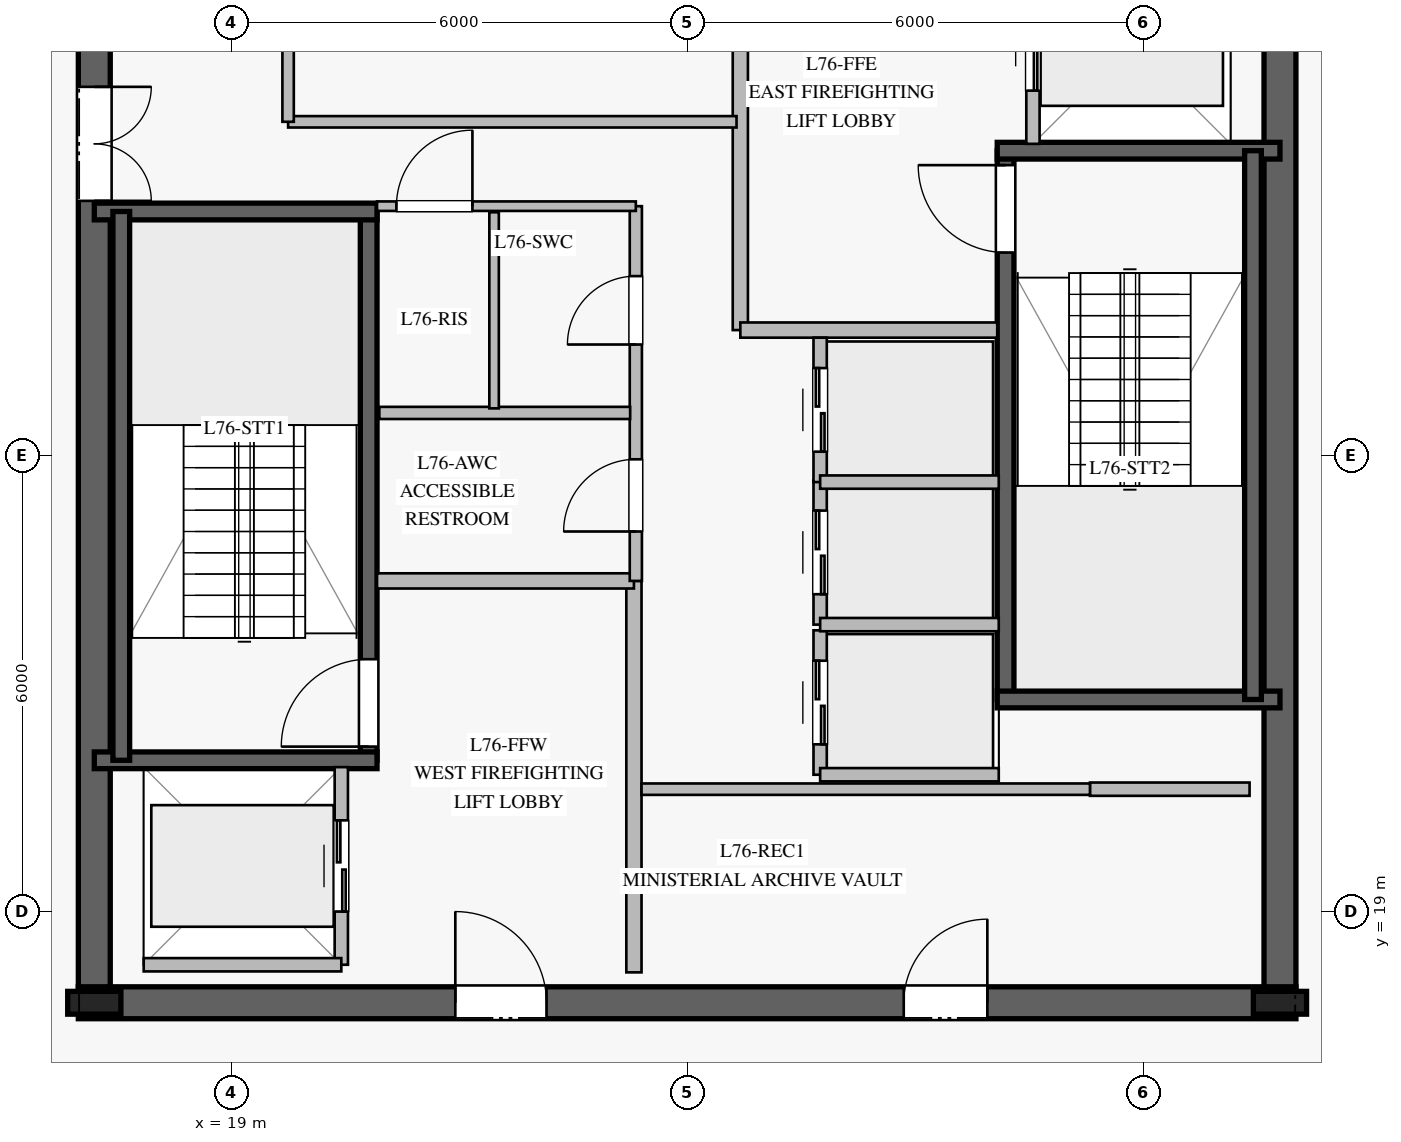
"""IFC4 building model, lengths in metres.
Left out: names, types, materials, properties, quantities, classifications, styles, units other than length and angle.
Written with IfcOpenShell. Run it as: python <this file> out.ifc"""

import sys

from ifc_helpers import new_model, si_unit, direction, frame, frame_2d, origin, origin_2d, place, context, subcontext, project, spatial, rectangle, i_section, extrude, element, fill, save


model = new_model("IFC4")
c1 = context("Model", 3, precision=1e-05, world=origin(), true_north=direction((0.0, 1.0)))
c2 = subcontext(c1, "Body", "Model", "MODEL_VIEW")
j1 = project(units=[si_unit("LENGTHUNIT", "METRE"), si_unit("PLANEANGLEUNIT", "RADIAN")], contexts=[c1])
p1 = place(None, origin())
s1 = spatial("IfcSite", under=j1, at=p1, CompositionType="ELEMENT")
p2 = place(p1, origin())
s2 = spatial("IfcBuilding", under=s1, at=p2, CompositionType="ELEMENT")
p3 = place(p2, frame((0.0, 0.0, 314.2)))
s3 = spatial("IfcBuildingStorey", under=s2, at=p3, CompositionType="ELEMENT", Elevation=314.2)
p4 = place(p3, frame((16.99, 17.8, 0.0), z_axis=(0.0, 0.0, 1.0), x_axis=(1.0, 0.0, 0.0)))
e1 = element("IfcWall", 1, at=p4, inside=s3, PredefinedType="SHEAR", context=c2, shape_type="SweptSolid", body=[
    extrude(rectangle(XDim=16.02, YDim=0.42, at=frame_2d((8.01, 0.0))), origin(), (0.0, 0.0, 1.0), 3.74),
])
p5 = place(p4, frame((4.96, 0.0, 0.0)))
e2 = element("IfcOpeningElement", 2, at=p5, cuts=e1, PredefinedType="OPENING", context=c2, shape_type="SweptSolid", body=[
    extrude(rectangle(XDim=1.2, YDim=2.25, at=frame_2d((0.6, 1.125))), frame((0.0, 0.22, 0.0), z_axis=(0.0, -1.0, 0.0), x_axis=(1.0, 0.0, 0.0)), (0.0, 0.0, 1.0), 0.44),
])
p6 = place(p4, frame((10.86, 0.0, 0.0)))
e3 = element("IfcOpeningElement", 3, at=p6, cuts=e1, PredefinedType="OPENING", context=c2, shape_type="SweptSolid", body=[
    extrude(rectangle(XDim=1.1, YDim=2.2, at=frame_2d((0.55, 1.1))), frame((0.0, 0.22, 0.0), z_axis=(0.0, -1.0, 0.0), x_axis=(1.0, 0.0, 0.0)), (0.0, 0.0, 1.0), 0.44),
])
p7 = place(p3, frame((17.2, 31.99, 0.0), z_axis=(0.0, 0.0, 1.0), x_axis=(0.0, -1.0, 0.0)))
e4 = element("IfcWall", 4, at=p7, inside=s3, PredefinedType="SHEAR", context=c2, shape_type="SweptSolid", body=[
    extrude(rectangle(XDim=13.98, YDim=0.42, at=frame_2d((6.99, 0.0))), origin(), (0.0, 0.0, 1.0), 3.74),
])
p8 = place(p7, frame((2.14, 0.0, 0.0)))
e5 = element("IfcOpeningElement", 5, at=p8, cuts=e4, PredefinedType="OPENING", context=c2, shape_type="SweptSolid", body=[
    extrude(rectangle(XDim=1.5, YDim=2.2, at=frame_2d((0.75, 1.1))), frame((0.0, 0.22, 0.0), z_axis=(0.0, -1.0, 0.0), x_axis=(1.0, 0.0, 0.0)), (0.0, 0.0, 1.0), 0.44),
])
p9 = place(p3, frame((32.8, 18.01, 0.0), z_axis=(0.0, 0.0, 1.0), x_axis=(0.0, 1.0, 0.0)))
e6 = element("IfcWall", 6, at=p9, inside=s3, PredefinedType="SHEAR", context=c2, shape_type="SweptSolid", body=[
    extrude(rectangle(XDim=13.98, YDim=0.42, at=frame_2d((6.99, 0.0))), origin(), (0.0, 0.0, 1.0), 3.74),
])
for number, where, z_axis, x_axis in (
    (7, (17.2, 17.8, 0.0), (0.0, 0.0, 1.0), (1.0, 0.0, 0.0)),
    (8, (32.8, 17.8, 0.0), (0.0, 0.0, 1.0), (1.0, 0.0, 0.0)),
):
    element("IfcColumn", number, at=place(p3, frame(where, z_axis=z_axis, x_axis=x_axis)), inside=s3, PredefinedType="COLUMN", context=c2, shape_type="SweptSolid", body=[
        extrude(i_section(OverallWidth=0.3, OverallDepth=0.7, WebThickness=0.017, FlangeThickness=0.032, at=origin_2d()), origin(), (0.0, 0.0, 1.0), 4.0),
    ])
p10 = place(p3, frame((20.81, 20.99, 0.0), z_axis=(0.0, 0.0, 1.0), x_axis=(0.0, 1.0, 0.0)))
e9 = element("IfcWall", 9, at=p10, inside=s3, PredefinedType="SOLIDWALL", context=c2, shape_type="SweptSolid", body=[
    extrude(rectangle(XDim=7.22, YDim=0.22, at=frame_2d((3.61, 0.0))), origin(), (0.0, 0.0, 1.0), 3.74),
])
p11 = place(p10, frame((0.18, 0.0, 0.0)))
e10 = element("IfcOpeningElement", 10, at=p11, cuts=e9, PredefinedType="OPENING", context=c2, shape_type="SweptSolid", body=[
    extrude(rectangle(XDim=1.15, YDim=2.2, at=frame_2d((0.575, 1.1))), frame((0.0, 0.12, 0.0), z_axis=(0.0, -1.0, 0.0), x_axis=(1.0, 0.0, 0.0)), (0.0, 0.0, 1.0), 0.24),
])
for number, where, z_axis, x_axis in (
    (11, (17.2, 20.99, 0.0), (0.0, 0.0, 1.0), (1.0, 0.0, 0.0)),
    (12, (17.2, 28.21, 0.0), (0.0, 0.0, 1.0), (1.0, 0.0, 0.0)),
):
    element("IfcWall", number, at=place(p3, frame(where, z_axis=z_axis, x_axis=x_axis)), inside=s3, PredefinedType="SOLIDWALL", context=c2, shape_type="SweptSolid", body=[
        extrude(rectangle(XDim=3.72, YDim=0.22, at=frame_2d((1.86, 0.0))), origin(), (0.0, 0.0, 1.0), 3.74),
    ])
p12 = place(p3, frame((17.555, 28.21, 0.0), z_axis=(0.0, 0.0, 1.0), x_axis=(0.0, -1.0, 0.0)))
e13 = element("IfcWall", 13, at=p12, inside=s3, PredefinedType="SOLIDWALL", context=c2, shape_type="SweptSolid", body=[
    extrude(rectangle(XDim=7.22, YDim=0.22, at=frame_2d((3.61, 0.0))), origin(), (0.0, 0.0, 1.0), 3.74),
])
p13 = place(p3, frame((29.19, 21.79, 0.0), z_axis=(0.0, 0.0, 1.0), x_axis=(0.0, 1.0, 0.0)))
e14 = element("IfcWall", 14, at=p13, inside=s3, PredefinedType="SOLIDWALL", context=c2, shape_type="SweptSolid", body=[
    extrude(rectangle(XDim=7.22, YDim=0.22, at=frame_2d((3.61, 0.0))), origin(), (0.0, 0.0, 1.0), 3.74),
])
p14 = place(p13, frame((5.88, 0.0, 0.0)))
e15 = element("IfcOpeningElement", 15, at=p14, cuts=e14, PredefinedType="OPENING", context=c2, shape_type="SweptSolid", body=[
    extrude(rectangle(XDim=1.15, YDim=2.2, at=frame_2d((0.575, 1.1))), frame((0.0, 0.12, 0.0), z_axis=(0.0, -1.0, 0.0), x_axis=(1.0, 0.0, 0.0)), (0.0, 0.0, 1.0), 0.24),
])
for number, where, z_axis, x_axis in (
    (16, (29.08, 21.79, 0.0), (0.0, 0.0, 1.0), (1.0, 0.0, 0.0)),
    (17, (29.08, 29.01, 0.0), (0.0, 0.0, 1.0), (1.0, 0.0, 0.0)),
):
    element("IfcWall", number, at=place(p3, frame(where, z_axis=z_axis, x_axis=x_axis)), inside=s3, PredefinedType="SOLIDWALL", context=c2, shape_type="SweptSolid", body=[
        extrude(rectangle(XDim=3.72, YDim=0.22, at=frame_2d((1.86, 0.0))), origin(), (0.0, 0.0, 1.0), 3.74),
    ])
p15 = place(p3, frame((32.445, 29.01, 0.0), z_axis=(0.0, 0.0, 1.0), x_axis=(0.0, -1.0, 0.0)))
e18 = element("IfcWall", 18, at=p15, inside=s3, PredefinedType="SOLIDWALL", context=c2, shape_type="SweptSolid", body=[
    extrude(rectangle(XDim=7.22, YDim=0.22, at=frame_2d((3.61, 0.0))), origin(), (0.0, 0.0, 1.0), 3.74),
])
p16 = place(p3, frame((24.3, 18.2, 0.0), z_axis=(0.0, 0.0, 1.0), x_axis=(0.0, 1.0, 0.0)))
e19 = element("IfcWall", 19, at=p16, inside=s3, PredefinedType="PARTITIONING", context=c2, shape_type="SweptSolid", body=[
    extrude(rectangle(XDim=5.15, YDim=0.2, at=frame_2d((2.575, 0.0))), origin(), (0.0, 0.0, 1.0), 3.74),
])
p17 = place(p3, frame((20.92, 23.35, 0.0), z_axis=(0.0, 0.0, 1.0), x_axis=(1.0, 0.0, 0.0)))
e20 = element("IfcWall", 20, at=p17, inside=s3, PredefinedType="PARTITIONING", context=c2, shape_type="SweptSolid", body=[
    extrude(rectangle(XDim=3.38, YDim=0.2, at=frame_2d((1.69, 0.0))), origin(), (0.0, 0.0, 1.0), 3.74),
])
p18 = place(p3, frame((25.7, 26.65, 0.0), z_axis=(0.0, 0.0, 1.0), x_axis=(0.0, 1.0, 0.0)))
e21 = element("IfcWall", 21, at=p18, inside=s3, PredefinedType="PARTITIONING", context=c2, shape_type="SweptSolid", body=[
    extrude(rectangle(XDim=5.15, YDim=0.2, at=frame_2d((2.575, 0.0))), origin(), (0.0, 0.0, 1.0), 3.74),
])
p19 = place(p3, frame((25.7, 26.65, 0.0), z_axis=(0.0, 0.0, 1.0), x_axis=(1.0, 0.0, 0.0)))
e22 = element("IfcWall", 22, at=p19, inside=s3, PredefinedType="PARTITIONING", context=c2, shape_type="SweptSolid", body=[
    extrude(rectangle(XDim=3.38, YDim=0.2, at=frame_2d((1.69, 0.0))), origin(), (0.0, 0.0, 1.0), 3.74),
])
p20 = place(p3, frame((24.325, 23.35, 0.0), z_axis=(0.0, 0.0, 1.0), x_axis=(0.0, 1.0, 0.0)))
e23 = element("IfcWall", 23, at=p20, inside=s3, PredefinedType="PLUMBINGWALL", context=c2, shape_type="SweptSolid", body=[
    extrude(rectangle(XDim=4.93, YDim=0.16, at=frame_2d((2.465, 0.0))), origin(), (0.0, 0.0, 1.0), 3.74),
])
p21 = place(p20, frame((0.65, 0.0, 0.0)))
e24 = element("IfcOpeningElement", 24, at=p21, cuts=e23, PredefinedType="OPENING", context=c2, shape_type="SweptSolid", body=[
    extrude(rectangle(XDim=0.95, YDim=2.1, at=frame_2d((0.475, 1.05))), frame((0.0, 0.09, 0.0), z_axis=(0.0, -1.0, 0.0), x_axis=(1.0, 0.0, 0.0)), (0.0, 0.0, 1.0), 0.18),
])
p22 = place(p20, frame((3.11, 0.0, 0.0)))
e25 = element("IfcOpeningElement", 25, at=p22, cuts=e23, PredefinedType="OPENING", context=c2, shape_type="SweptSolid", body=[
    extrude(rectangle(XDim=0.9, YDim=2.1, at=frame_2d((0.45, 1.05))), frame((0.0, 0.09, 0.0), z_axis=(0.0, -1.0, 0.0), x_axis=(1.0, 0.0, 0.0)), (0.0, 0.0, 1.0), 0.18),
])
p23 = place(p3, frame((20.92, 28.28, 0.0), z_axis=(0.0, 0.0, 1.0), x_axis=(1.0, 0.0, 0.0)))
e26 = element("IfcWall", 26, at=p23, inside=s3, PredefinedType="PARTITIONING", context=c2, shape_type="SweptSolid", body=[
    extrude(rectangle(XDim=3.405, YDim=0.125, at=frame_2d((1.703, 0.0))), origin(), (0.0, 0.0, 1.0), 3.74),
])
p24 = place(p23, frame((0.255, 0.0, 0.0)))
e27 = element("IfcOpeningElement", 27, at=p24, cuts=e26, PredefinedType="OPENING", context=c2, shape_type="SweptSolid", body=[
    extrude(rectangle(XDim=1.0, YDim=2.15, at=frame_2d((0.5, 1.075))), frame((0.0, 0.073, 0.0), z_axis=(0.0, -1.0, 0.0), x_axis=(1.0, 0.0, 0.0)), (0.0, 0.0, 1.0), 0.145),
])
p25 = place(p3, frame((20.95, 25.56, 0.0), z_axis=(0.0, 0.0, 1.0), x_axis=(1.0, 0.0, 0.0)))
e28 = element("IfcWall", 28, at=p25, inside=s3, PredefinedType="PLUMBINGWALL", context=c2, shape_type="SweptSolid", body=[
    extrude(rectangle(XDim=3.3, YDim=0.16, at=frame_2d((1.65, 0.0))), origin(), (0.0, 0.0, 1.0), 3.74),
])
p26 = place(p3, frame((22.46, 25.62, 0.0), z_axis=(0.0, 0.0, 1.0), x_axis=(0.0, 1.0, 0.0)))
e29 = element("IfcWall", 29, at=p26, inside=s3, PredefinedType="PARTITIONING", context=c2, shape_type="SweptSolid", body=[
    extrude(rectangle(XDim=2.58, YDim=0.125, at=frame_2d((1.29, 0.0))), origin(), (0.0, 0.0, 1.0), 3.74),
])
p27 = place(p3, frame((30.3, 20.61, 0.0), z_axis=(0.0, 0.0, 1.0), x_axis=(1.0, 0.0, 0.0)))
e30 = element("IfcWall", 30, at=p27, inside=s3, PredefinedType="PARTITIONING", context=c2, shape_type="SweptSolid", body=[
    extrude(rectangle(XDim=2.1, YDim=0.175, at=frame_2d((1.05, 0.0))), origin(), (0.0, 0.0, 1.0), 3.74),
])
p28 = place(p3, frame((24.4, 20.61, 0.0), z_axis=(0.0, 0.0, 1.0), x_axis=(1.0, 0.0, 0.0)))
e31 = element("IfcWall", 31, at=p28, inside=s3, PredefinedType="PARTITIONING", context=c2, shape_type="SweptSolid", body=[
    extrude(rectangle(XDim=5.9, YDim=0.15, at=frame_2d((2.95, 0.0))), origin(), (0.0, 0.0, 1.0), 3.74),
])
p29 = place(p3, frame((19.75, 29.39, 0.0), z_axis=(0.0, 0.0, 1.0), x_axis=(1.0, 0.0, 0.0)))
e32 = element("IfcWall", 32, at=p29, inside=s3, PredefinedType="PARTITIONING", context=c2, shape_type="SweptSolid", body=[
    extrude(rectangle(XDim=5.9, YDim=0.15, at=frame_2d((2.95, 0.0))), origin(), (0.0, 0.0, 1.0), 3.74),
])
p30 = place(p3, frame((19.75, 29.39, 0.0), z_axis=(0.0, 0.0, 1.0), x_axis=(0.0, 1.0, 0.0)))
e33 = element("IfcWall", 33, at=p30, inside=s3, PredefinedType="PARTITIONING", context=c2, shape_type="SweptSolid", body=[
    extrude(rectangle(XDim=2.41, YDim=0.15, at=frame_2d((1.205, 0.0))), origin(), (0.0, 0.0, 1.0), 3.74),
])
p31 = place(p3, frame((26.75, 20.8, 0.0), z_axis=(0.0, 0.0, 1.0), x_axis=(0.0, 1.0, 0.0)))
e34 = element("IfcWall", 34, at=p31, inside=s3, PredefinedType="PARTITIONING", context=c2, shape_type="SweptSolid", body=[
    extrude(rectangle(XDim=1.9, YDim=0.175, at=frame_2d((0.95, 0.0))), origin(), (0.0, 0.0, 1.0), 3.74),
])
p32 = place(p31, frame((0.4, 0.0, 0.0)))
e35 = element("IfcOpeningElement", 35, at=p32, cuts=e34, PredefinedType="OPENING", context=c2, shape_type="SweptSolid", body=[
    extrude(rectangle(XDim=1.1, YDim=2.2, at=frame_2d((0.55, 1.1))), frame((0.0, 0.098, 0.0), z_axis=(0.0, -1.0, 0.0), x_axis=(1.0, 0.0, 0.0)), (0.0, 0.0, 1.0), 0.195),
])
p33 = place(p3, frame((26.75, 20.8, 0.0), z_axis=(0.0, 0.0, 1.0), x_axis=(1.0, 0.0, 0.0)))
e36 = element("IfcWall", 36, at=p33, inside=s3, PredefinedType="PARTITIONING", context=c2, shape_type="SweptSolid", body=[
    extrude(rectangle(XDim=2.35, YDim=0.175, at=frame_2d((1.175, 0.0))), origin(), (0.0, 0.0, 1.0), 3.74),
])
p34 = place(p3, frame((26.75, 22.775, 0.0), z_axis=(0.0, 0.0, 1.0), x_axis=(0.0, 1.0, 0.0)))
e37 = element("IfcWall", 37, at=p34, inside=s3, PredefinedType="PARTITIONING", context=c2, shape_type="SweptSolid", body=[
    extrude(rectangle(XDim=1.9, YDim=0.175, at=frame_2d((0.95, 0.0))), origin(), (0.0, 0.0, 1.0), 3.74),
])
p35 = place(p34, frame((0.4, 0.0, 0.0)))
e38 = element("IfcOpeningElement", 38, at=p35, cuts=e37, PredefinedType="OPENING", context=c2, shape_type="SweptSolid", body=[
    extrude(rectangle(XDim=1.1, YDim=2.2, at=frame_2d((0.55, 1.1))), frame((0.0, 0.098, 0.0), z_axis=(0.0, -1.0, 0.0), x_axis=(1.0, 0.0, 0.0)), (0.0, 0.0, 1.0), 0.195),
])
p36 = place(p3, frame((26.75, 22.775, 0.0), z_axis=(0.0, 0.0, 1.0), x_axis=(1.0, 0.0, 0.0)))
e39 = element("IfcWall", 39, at=p36, inside=s3, PredefinedType="PARTITIONING", context=c2, shape_type="SweptSolid", body=[
    extrude(rectangle(XDim=2.35, YDim=0.175, at=frame_2d((1.175, 0.0))), origin(), (0.0, 0.0, 1.0), 3.74),
])
p37 = place(p3, frame((26.75, 24.65, 0.0), z_axis=(0.0, 0.0, 1.0), x_axis=(0.0, 1.0, 0.0)))
e40 = element("IfcWall", 40, at=p37, inside=s3, PredefinedType="PARTITIONING", context=c2, shape_type="SweptSolid", body=[
    extrude(rectangle(XDim=1.9, YDim=0.175, at=frame_2d((0.95, 0.0))), origin(), (0.0, 0.0, 1.0), 3.74),
])
p38 = place(p37, frame((0.4, 0.0, 0.0)))
e41 = element("IfcOpeningElement", 41, at=p38, cuts=e40, PredefinedType="OPENING", context=c2, shape_type="SweptSolid", body=[
    extrude(rectangle(XDim=1.1, YDim=2.2, at=frame_2d((0.55, 1.1))), frame((0.0, 0.098, 0.0), z_axis=(0.0, -1.0, 0.0), x_axis=(1.0, 0.0, 0.0)), (0.0, 0.0, 1.0), 0.195),
])
p39 = place(p3, frame((26.75, 24.65, 0.0), z_axis=(0.0, 0.0, 1.0), x_axis=(1.0, 0.0, 0.0)))
e42 = element("IfcWall", 42, at=p39, inside=s3, PredefinedType="PARTITIONING", context=c2, shape_type="SweptSolid", body=[
    extrude(rectangle(XDim=2.35, YDim=0.175, at=frame_2d((1.175, 0.0))), origin(), (0.0, 0.0, 1.0), 3.74),
])
p40 = place(p3, frame((20.45, 18.3, 0.0), z_axis=(0.0, 0.0, 1.0), x_axis=(0.0, 1.0, 0.0)))
e43 = element("IfcWall", 43, at=p40, inside=s3, PredefinedType="PARTITIONING", context=c2, shape_type="SweptSolid", body=[
    extrude(rectangle(XDim=2.6, YDim=0.175, at=frame_2d((1.3, 0.0))), origin(), (0.0, 0.0, 1.0), 3.74),
])
p41 = place(p40, frame((0.7, 0.0, 0.0)))
e44 = element("IfcOpeningElement", 44, at=p41, cuts=e43, PredefinedType="OPENING", context=c2, shape_type="SweptSolid", body=[
    extrude(rectangle(XDim=1.2, YDim=2.2, at=frame_2d((0.6, 1.1))), frame((0.0, 0.098, 0.0), z_axis=(0.0, -1.0, 0.0), x_axis=(1.0, 0.0, 0.0)), (0.0, 0.0, 1.0), 0.195),
])
p42 = place(p3, frame((17.85, 18.3, 0.0), z_axis=(0.0, 0.0, 1.0), x_axis=(1.0, 0.0, 0.0)))
e45 = element("IfcWall", 45, at=p42, inside=s3, PredefinedType="PARTITIONING", context=c2, shape_type="SweptSolid", body=[
    extrude(rectangle(XDim=2.6, YDim=0.175, at=frame_2d((1.3, 0.0))), origin(), (0.0, 0.0, 1.0), 3.74),
])
p43 = place(p3, frame((29.55, 29.1, 0.0), z_axis=(0.0, 0.0, 1.0), x_axis=(0.0, 1.0, 0.0)))
e46 = element("IfcWall", 46, at=p43, inside=s3, PredefinedType="PARTITIONING", context=c2, shape_type="SweptSolid", body=[
    extrude(rectangle(XDim=2.6, YDim=0.175, at=frame_2d((1.3, 0.0))), origin(), (0.0, 0.0, 1.0), 3.74),
])
p44 = place(p43, frame((0.7, 0.0, 0.0)))
e47 = element("IfcOpeningElement", 47, at=p44, cuts=e46, PredefinedType="OPENING", context=c2, shape_type="SweptSolid", body=[
    extrude(rectangle(XDim=1.2, YDim=2.2, at=frame_2d((0.6, 1.1))), frame((0.0, 0.098, 0.0), z_axis=(0.0, -1.0, 0.0), x_axis=(1.0, 0.0, 0.0)), (0.0, 0.0, 1.0), 0.195),
])
p45 = place(p11, origin())
e48 = element("IfcDoor", 48, at=p45, inside=s3, OperationType="SINGLE_SWING_LEFT", PredefinedType="DOOR", context=c2, shape_type="SweptSolid", body=[
    extrude(rectangle(XDim=1.15, YDim=2.2, at=frame_2d((0.575, 1.1))), frame((0.0, 0.025, 0.0), z_axis=(0.0, -1.0, 0.0), x_axis=(1.0, 0.0, 0.0)), (0.0, 0.0, 1.0), 0.05),
])
fill(e10, e48)
p46 = place(p14, origin())
e49 = element("IfcDoor", 49, at=p46, inside=s3, OperationType="SINGLE_SWING_RIGHT", PredefinedType="DOOR", context=c2, shape_type="SweptSolid", body=[
    extrude(rectangle(XDim=1.15, YDim=2.2, at=frame_2d((0.575, 1.1))), frame((0.0, 0.025, 0.0), z_axis=(0.0, -1.0, 0.0), x_axis=(1.0, 0.0, 0.0)), (0.0, 0.0, 1.0), 0.05),
])
fill(e15, e49)
p47 = place(p5, origin())
e50 = element("IfcDoor", 50, at=p47, inside=s3, OperationType="SINGLE_SWING_LEFT", PredefinedType="DOOR", context=c2, shape_type="SweptSolid", body=[
    extrude(rectangle(XDim=1.2, YDim=2.25, at=frame_2d((0.6, 1.125))), frame((0.0, 0.025, 0.0), z_axis=(0.0, -1.0, 0.0), x_axis=(1.0, 0.0, 0.0)), (0.0, 0.0, 1.0), 0.05),
])
fill(e2, e50)
p48 = place(p8, origin())
e51 = element("IfcDoor", 51, at=p48, inside=s3, OperationType="DOUBLE_DOOR_SINGLE_SWING", PredefinedType="DOOR", context=c2, shape_type="SweptSolid", body=[
    extrude(rectangle(XDim=1.5, YDim=2.2, at=frame_2d((0.75, 1.1))), frame((0.0, 0.025, 0.0), z_axis=(0.0, -1.0, 0.0), x_axis=(1.0, 0.0, 0.0)), (0.0, 0.0, 1.0), 0.05),
])
fill(e5, e51)
p49 = place(p21, origin())
e52 = element("IfcDoor", 52, at=p49, inside=s3, OperationType="SINGLE_SWING_LEFT", PredefinedType="DOOR", context=c2, shape_type="SweptSolid", body=[
    extrude(rectangle(XDim=0.95, YDim=2.1, at=frame_2d((0.475, 1.05))), frame((0.0, 0.025, 0.0), z_axis=(0.0, -1.0, 0.0), x_axis=(1.0, 0.0, 0.0)), (0.0, 0.0, 1.0), 0.05),
])
fill(e24, e52)
p50 = place(p24, origin())
e53 = element("IfcDoor", 53, at=p50, inside=s3, OperationType="SINGLE_SWING_RIGHT", PredefinedType="DOOR", context=c2, shape_type="SweptSolid", body=[
    extrude(rectangle(XDim=1.0, YDim=2.15, at=frame_2d((0.5, 1.075))), frame((0.0, 0.025, 0.0), z_axis=(0.0, -1.0, 0.0), x_axis=(1.0, 0.0, 0.0)), (0.0, 0.0, 1.0), 0.05),
])
fill(e27, e53)
p51 = place(p22, origin())
e54 = element("IfcDoor", 54, at=p51, inside=s3, OperationType="SINGLE_SWING_LEFT", PredefinedType="DOOR", context=c2, shape_type="SweptSolid", body=[
    extrude(rectangle(XDim=0.9, YDim=2.1, at=frame_2d((0.45, 1.05))), frame((0.0, 0.025, 0.0), z_axis=(0.0, -1.0, 0.0), x_axis=(1.0, 0.0, 0.0)), (0.0, 0.0, 1.0), 0.05),
])
fill(e25, e54)
p52 = place(p6, origin())
e55 = element("IfcDoor", 55, at=p52, inside=s3, OperationType="SINGLE_SWING_RIGHT", PredefinedType="DOOR", context=c2, shape_type="SweptSolid", body=[
    extrude(rectangle(XDim=1.1, YDim=2.2, at=frame_2d((0.55, 1.1))), frame((0.0, 0.025, 0.0), z_axis=(0.0, -1.0, 0.0), x_axis=(1.0, 0.0, 0.0)), (0.0, 0.0, 1.0), 0.05),
])
fill(e3, e55)
p53 = place(p32, origin())
e56 = element("IfcDoor", 56, at=p53, inside=s3, OperationType="DOUBLE_DOOR_SLIDING", PredefinedType="DOOR", context=c2, shape_type="SweptSolid", body=[
    extrude(rectangle(XDim=1.1, YDim=2.2, at=frame_2d((0.55, 1.1))), frame((0.0, 0.025, 0.0), z_axis=(0.0, -1.0, 0.0), x_axis=(1.0, 0.0, 0.0)), (0.0, 0.0, 1.0), 0.05),
])
fill(e35, e56)
p54 = place(p35, origin())
e57 = element("IfcDoor", 57, at=p54, inside=s3, OperationType="DOUBLE_DOOR_SLIDING", PredefinedType="DOOR", context=c2, shape_type="SweptSolid", body=[
    extrude(rectangle(XDim=1.1, YDim=2.2, at=frame_2d((0.55, 1.1))), frame((0.0, 0.025, 0.0), z_axis=(0.0, -1.0, 0.0), x_axis=(1.0, 0.0, 0.0)), (0.0, 0.0, 1.0), 0.05),
])
fill(e38, e57)
p55 = place(p38, origin())
e58 = element("IfcDoor", 58, at=p55, inside=s3, OperationType="DOUBLE_DOOR_SLIDING", PredefinedType="DOOR", context=c2, shape_type="SweptSolid", body=[
    extrude(rectangle(XDim=1.1, YDim=2.2, at=frame_2d((0.55, 1.1))), frame((0.0, 0.025, 0.0), z_axis=(0.0, -1.0, 0.0), x_axis=(1.0, 0.0, 0.0)), (0.0, 0.0, 1.0), 0.05),
])
fill(e41, e58)
p56 = place(p41, origin())
e59 = element("IfcDoor", 59, at=p56, inside=s3, OperationType="DOUBLE_DOOR_SLIDING", PredefinedType="DOOR", context=c2, shape_type="SweptSolid", body=[
    extrude(rectangle(XDim=1.2, YDim=2.2, at=frame_2d((0.6, 1.1))), frame((0.0, 0.025, 0.0), z_axis=(0.0, -1.0, 0.0), x_axis=(1.0, 0.0, 0.0)), (0.0, 0.0, 1.0), 0.05),
])
fill(e44, e59)
p57 = place(p44, origin())
e60 = element("IfcDoor", 60, at=p57, inside=s3, OperationType="DOUBLE_DOOR_SLIDING", PredefinedType="DOOR", context=c2, shape_type="SweptSolid", body=[
    extrude(rectangle(XDim=1.2, YDim=2.2, at=frame_2d((0.6, 1.1))), frame((0.0, 0.025, 0.0), z_axis=(0.0, -1.0, 0.0), x_axis=(1.0, 0.0, 0.0)), (0.0, 0.0, 1.0), 0.05),
])
fill(e47, e60)
save(model, sys.argv[1])
